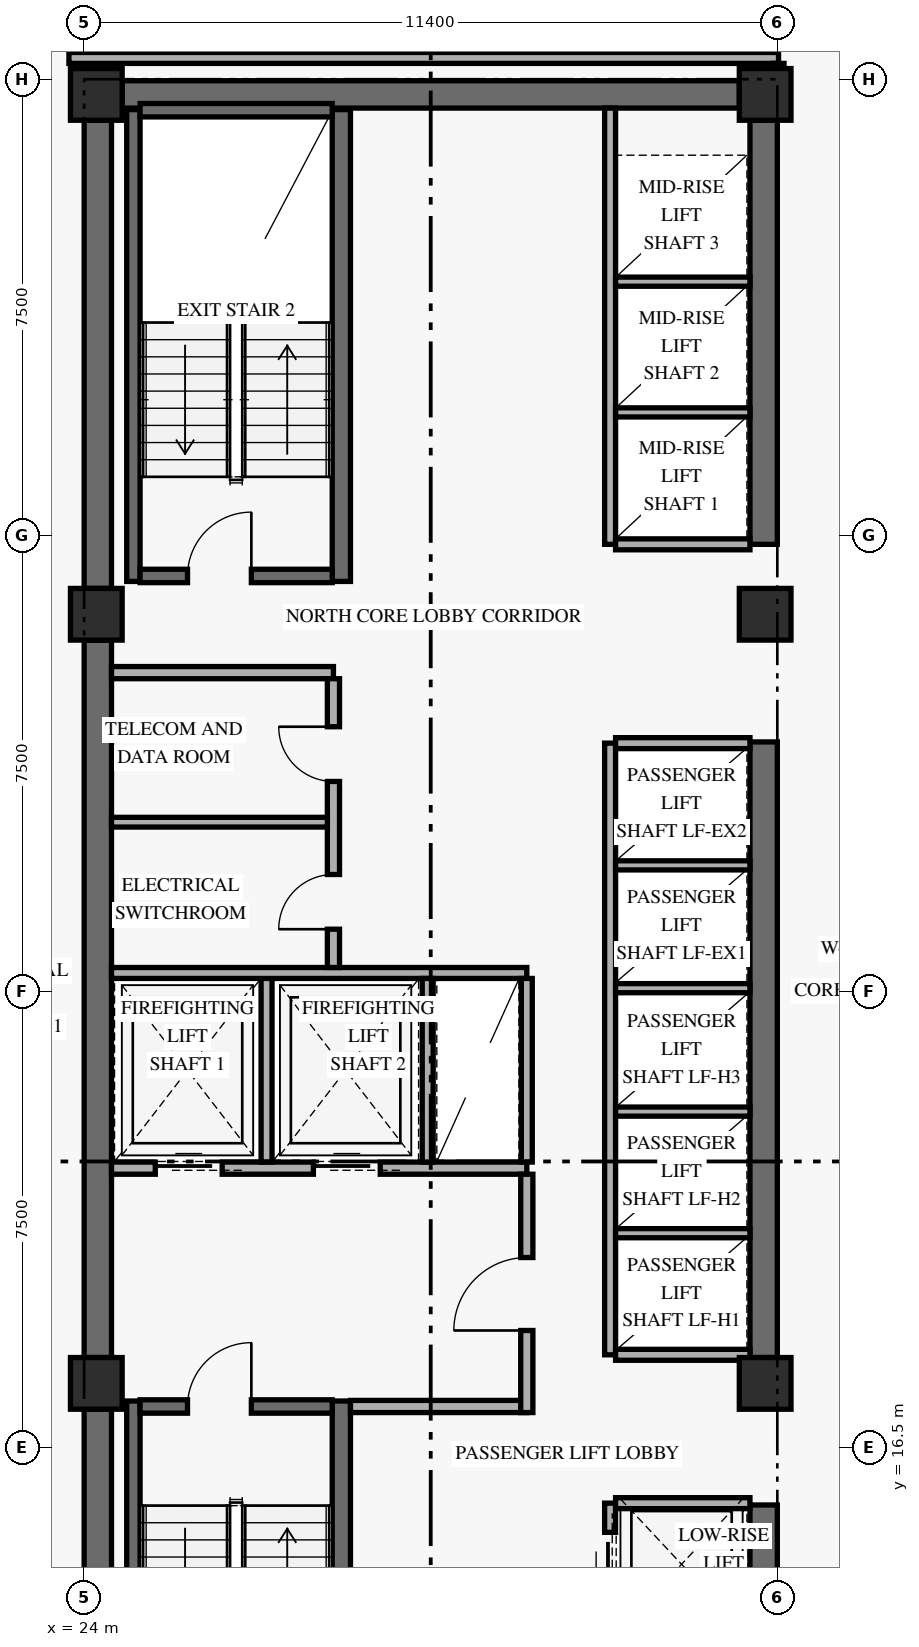
"""IFC4 building model, lengths in metres.
Left out: names, types, materials, properties, quantities, classifications, styles, units other than length and angle.
Written with IfcOpenShell. Run it as: python <this file> out.ifc"""

import sys

from ifc_helpers import new_model, si_unit, direction, frame, frame_2d, origin, origin_2d, place, context, subcontext, project, spatial, rectangle, extrude, element, fill, save


model = new_model("IFC4")
c1 = context("Model", 3, precision=1e-05, world=origin(), true_north=direction((0.0, 1.0)))
c2 = subcontext(c1, "Body", "Model", "MODEL_VIEW")
j1 = project(units=[si_unit("LENGTHUNIT", "METRE"), si_unit("PLANEANGLEUNIT", "RADIAN")], contexts=[c1])
p1 = place(None, origin())
s1 = spatial("IfcSite", under=j1, at=p1, CompositionType="ELEMENT")
p2 = place(p1, origin())
s2 = spatial("IfcBuilding", under=s1, at=p2, CompositionType="ELEMENT")
p3 = place(p2, frame((0.0, 0.0, 27.6)))
s3 = spatial("IfcBuildingStorey", under=s2, at=p3, CompositionType="ELEMENT", Elevation=27.6)
p4 = place(p3, frame((24.225, 9.675, 0.0), z_axis=(0.0, 0.0, 1.0), x_axis=(0.0, 1.0, 0.0)))
e1 = element("IfcWall", 1, at=p4, inside=s3, PredefinedType="SHEAR", context=c2, shape_type="SweptSolid", body=[
    extrude(rectangle(XDim=7.45, YDim=0.45, at=frame_2d((3.725, 0.0))), origin(), (0.0, 0.0, 1.0), 2.667),
])
p5 = place(p3, frame((24.225, 17.975, 0.0), z_axis=(0.0, 0.0, 1.0), x_axis=(0.0, 1.0, 0.0)))
e2 = element("IfcWall", 2, at=p5, inside=s3, PredefinedType="SHEAR", context=c2, shape_type="SweptSolid", body=[
    extrude(rectangle(XDim=11.8, YDim=0.45, at=frame_2d((5.9, 0.0))), origin(), (0.0, 0.0, 1.0), 2.667),
])
p6 = place(p3, frame((24.225, 30.625, 0.0), z_axis=(0.0, 0.0, 1.0), x_axis=(0.0, 1.0, 0.0)))
e3 = element("IfcWall", 3, at=p6, inside=s3, PredefinedType="SHEAR", context=c2, shape_type="SweptSolid", body=[
    extrude(rectangle(XDim=7.7, YDim=0.45, at=frame_2d((3.85, 0.0))), origin(), (0.0, 0.0, 1.0), 2.667),
])
p7 = place(p3, frame((35.175, 9.675, 0.0), z_axis=(0.0, 0.0, 1.0), x_axis=(0.0, 1.0, 0.0)))
e4 = element("IfcWall", 4, at=p7, inside=s3, PredefinedType="SHEAR", context=c2, shape_type="SweptSolid", body=[
    extrude(rectangle(XDim=5.875, YDim=0.45, at=frame_2d((2.938, 0.0))), origin(), (0.0, 0.0, 1.0), 2.667),
])
p8 = place(p3, frame((35.175, 17.975, 0.0), z_axis=(0.0, 0.0, 1.0), x_axis=(0.0, 1.0, 0.0)))
e5 = element("IfcWall", 5, at=p8, inside=s3, PredefinedType="SHEAR", context=c2, shape_type="SweptSolid", body=[
    extrude(rectangle(XDim=10.125, YDim=0.45, at=frame_2d((5.062, 0.0))), origin(), (0.0, 0.0, 1.0), 2.667),
])
p9 = place(p3, frame((35.175, 31.35, 0.0), z_axis=(0.0, 0.0, 1.0), x_axis=(0.0, 1.0, 0.0)))
e6 = element("IfcWall", 6, at=p9, inside=s3, PredefinedType="SHEAR", context=c2, shape_type="SweptSolid", body=[
    extrude(rectangle(XDim=6.975, YDim=0.45, at=frame_2d((3.487, 0.0))), origin(), (0.0, 0.0, 1.0), 2.667),
])
p10 = place(p3, frame((24.625, 38.75, 0.0), z_axis=(0.0, 0.0, 1.0), x_axis=(1.0, 0.0, 0.0)))
e7 = element("IfcWall", 7, at=p10, inside=s3, PredefinedType="SHEAR", context=c2, shape_type="SweptSolid", body=[
    extrude(rectangle(XDim=10.15, YDim=0.45, at=frame_2d((5.075, 0.0))), origin(), (0.0, 0.0, 1.0), 3.36),
])
p11 = place(p3, frame((24.81, 9.5, 0.0), z_axis=(0.0, 0.0, 1.0), x_axis=(0.0, 1.0, 0.0)))
e8 = element("IfcWall", 8, at=p11, inside=s3, PredefinedType="SHEAR", context=c2, shape_type="SweptSolid", body=[
    extrude(rectangle(XDim=7.76, YDim=0.22, at=frame_2d((3.88, 0.0))), origin(), (0.0, 0.0, 1.0), 3.36),
])
p12 = place(p3, frame((28.23, 9.5, 0.0), z_axis=(0.0, 0.0, 1.0), x_axis=(0.0, 1.0, 0.0)))
e9 = element("IfcWall", 9, at=p12, inside=s3, PredefinedType="SHEAR", context=c2, shape_type="SweptSolid", body=[
    extrude(rectangle(XDim=7.76, YDim=0.3, at=frame_2d((3.88, 0.0))), origin(), (0.0, 0.0, 1.0), 3.36),
])
p13 = place(p3, frame((24.92, 17.17, 0.0), z_axis=(0.0, 0.0, 1.0), x_axis=(1.0, 0.0, 0.0)))
e10 = element("IfcWall", 10, at=p13, inside=s3, PredefinedType="SHEAR", context=c2, shape_type="SweptSolid", body=[
    extrude(rectangle(XDim=3.16, YDim=0.22, at=frame_2d((1.58, 0.0))), origin(), (0.0, 0.0, 1.0), 3.36),
])
p14 = place(p13, frame((0.78, 0.0, 0.0)))
e11 = element("IfcOpeningElement", 11, at=p14, cuts=e10, PredefinedType="OPENING", context=c2, shape_type="SweptSolid", body=[
    extrude(rectangle(XDim=1.05, YDim=2.15, at=frame_2d((0.525, 1.075))), frame((0.0, 0.12, 0.0), z_axis=(0.0, -1.0, 0.0), x_axis=(1.0, 0.0, 0.0)), (0.0, 0.0, 1.0), 0.24),
])
p15 = place(p3, frame((24.81, 30.74, 0.0), z_axis=(0.0, 0.0, 1.0), x_axis=(0.0, 1.0, 0.0)))
e12 = element("IfcWall", 12, at=p15, inside=s3, PredefinedType="SHEAR", context=c2, shape_type="SweptSolid", body=[
    extrude(rectangle(XDim=7.76, YDim=0.22, at=frame_2d((3.88, 0.0))), origin(), (0.0, 0.0, 1.0), 3.36),
])
p16 = place(p3, frame((28.23, 30.74, 0.0), z_axis=(0.0, 0.0, 1.0), x_axis=(0.0, 1.0, 0.0)))
e13 = element("IfcWall", 13, at=p16, inside=s3, PredefinedType="SHEAR", context=c2, shape_type="SweptSolid", body=[
    extrude(rectangle(XDim=7.76, YDim=0.3, at=frame_2d((3.88, 0.0))), origin(), (0.0, 0.0, 1.0), 3.36),
])
p17 = place(p3, frame((24.92, 30.83, 0.0), z_axis=(0.0, 0.0, 1.0), x_axis=(1.0, 0.0, 0.0)))
e14 = element("IfcWall", 14, at=p17, inside=s3, PredefinedType="SHEAR", context=c2, shape_type="SweptSolid", body=[
    extrude(rectangle(XDim=3.16, YDim=0.22, at=frame_2d((1.58, 0.0))), origin(), (0.0, 0.0, 1.0), 3.36),
])
p18 = place(p17, frame((0.78, 0.0, 0.0)))
e15 = element("IfcOpeningElement", 15, at=p18, cuts=e14, PredefinedType="OPENING", context=c2, shape_type="SweptSolid", body=[
    extrude(rectangle(XDim=1.05, YDim=2.15, at=frame_2d((0.525, 1.075))), frame((0.0, 0.12, 0.0), z_axis=(0.0, -1.0, 0.0), x_axis=(1.0, 0.0, 0.0)), (0.0, 0.0, 1.0), 0.24),
])
p19 = place(p3, frame((24.92, 38.49, 0.0), z_axis=(0.0, 0.0, 1.0), x_axis=(1.0, 0.0, 0.0)))
e16 = element("IfcWall", 16, at=p19, inside=s3, PredefinedType="SHEAR", context=c2, shape_type="SweptSolid", body=[
    extrude(rectangle(XDim=3.16, YDim=0.22, at=frame_2d((1.58, 0.0))), origin(), (0.0, 0.0, 1.0), 3.36),
])
for number, where, z_axis, x_axis in (
    (17, (24.2, 17.55, 0.0), (0.0, 0.0, 1.0), (1.0, 0.0, 0.0)),
    (18, (24.2, 30.2, 0.0), (0.0, 0.0, 1.0), (1.0, 0.0, 0.0)),
    (19, (24.2, 38.75, 0.0), (0.0, 0.0, 1.0), (1.0, 0.0, 0.0)),
    (20, (35.2, 17.55, 0.0), (0.0, 0.0, 1.0), (1.0, 0.0, 0.0)),
    (21, (35.2, 30.2, 0.0), (0.0, 0.0, 1.0), (1.0, 0.0, 0.0)),
    (22, (35.2, 38.75, 0.0), (0.0, 0.0, 1.0), (1.0, 0.0, 0.0)),
):
    element("IfcColumn", number, at=place(p3, frame(where, z_axis=z_axis, x_axis=x_axis)), inside=s3, PredefinedType="COLUMN", context=c2, shape_type="SweptSolid", body=[
        extrude(rectangle(XDim=0.85, YDim=0.85, at=origin_2d()), origin(), (0.0, 0.0, 1.0), 3.6),
    ])
p20 = place(p3, frame((24.45, 21.09, 0.0), z_axis=(0.0, 0.0, 1.0), x_axis=(1.0, 0.0, 0.0)))
e23 = element("IfcWall", 23, at=p20, inside=s3, PredefinedType="STANDARD", context=c2, shape_type="SweptSolid", body=[
    extrude(rectangle(XDim=6.83, YDim=0.2, at=frame_2d((3.415, 0.0))), origin(), (0.0, 0.0, 1.0), 3.36),
])
p21 = place(p20, frame((0.72, 0.0, 0.0)))
e24 = element("IfcOpeningElement", 24, at=p21, cuts=e23, PredefinedType="OPENING", context=c2, shape_type="SweptSolid", body=[
    extrude(rectangle(XDim=1.1, YDim=2.2, at=frame_2d((0.55, 1.1))), frame((0.0, 0.11, 0.0), z_axis=(0.0, -1.0, 0.0), x_axis=(1.0, 0.0, 0.0)), (0.0, 0.0, 1.0), 0.22),
])
p22 = place(p20, frame((3.32, 0.0, 0.0)))
e25 = element("IfcOpeningElement", 25, at=p22, cuts=e23, PredefinedType="OPENING", context=c2, shape_type="SweptSolid", body=[
    extrude(rectangle(XDim=1.1, YDim=2.2, at=frame_2d((0.55, 1.1))), frame((0.0, 0.11, 0.0), z_axis=(0.0, -1.0, 0.0), x_axis=(1.0, 0.0, 0.0)), (0.0, 0.0, 1.0), 0.22),
])
p23 = place(p3, frame((28.38, 17.17, 0.0), z_axis=(0.0, 0.0, 1.0), x_axis=(1.0, 0.0, 0.0)))
e26 = element("IfcWall", 26, at=p23, inside=s3, PredefinedType="STANDARD", context=c2, shape_type="SweptSolid", body=[
    extrude(rectangle(XDim=2.9, YDim=0.2, at=frame_2d((1.45, 0.0))), origin(), (0.0, 0.0, 1.0), 3.36),
])
p24 = place(p3, frame((31.28, 17.07, 0.0), z_axis=(0.0, 0.0, 1.0), x_axis=(0.0, 1.0, 0.0)))
e27 = element("IfcWall", 27, at=p24, inside=s3, PredefinedType="STANDARD", context=c2, shape_type="SweptSolid", body=[
    extrude(rectangle(XDim=3.92, YDim=0.2, at=frame_2d((1.96, 0.0))), origin(), (0.0, 0.0, 1.0), 2.649),
])
p25 = place(p24, frame((1.35, 0.0, 0.0)))
e28 = element("IfcOpeningElement", 28, at=p25, cuts=e27, PredefinedType="OPENING", context=c2, shape_type="SweptSolid", body=[
    extrude(rectangle(XDim=1.2, YDim=2.15, at=frame_2d((0.6, 1.075))), frame((0.0, 0.11, 0.0), z_axis=(0.0, -1.0, 0.0), x_axis=(1.0, 0.0, 0.0)), (0.0, 0.0, 1.0), 0.22),
])
p26 = place(p3, frame((27.0, 21.19, 0.0), z_axis=(0.0, 0.0, 1.0), x_axis=(0.0, 1.0, 0.0)))
e29 = element("IfcWall", 29, at=p26, inside=s3, PredefinedType="STANDARD", context=c2, shape_type="SweptSolid", body=[
    extrude(rectangle(XDim=3.11, YDim=0.18, at=frame_2d((1.555, 0.0))), origin(), (0.0, 0.0, 1.0), 3.36),
])
p27 = place(p3, frame((24.45, 24.3, 0.0), z_axis=(0.0, 0.0, 1.0), x_axis=(1.0, 0.0, 0.0)))
e30 = element("IfcWall", 30, at=p27, inside=s3, PredefinedType="STANDARD", context=c2, shape_type="SweptSolid", body=[
    extrude(rectangle(XDim=6.83, YDim=0.18, at=frame_2d((3.415, 0.0))), origin(), (0.0, 0.0, 1.0), 3.36),
])
for number, where, z_axis, x_axis in (
    (31, (29.65, 21.19, 0.0), (0.0, 0.0, 1.0), (0.0, 1.0, 0.0)),
    (32, (31.28, 21.19, 0.0), (0.0, 0.0, 1.0), (0.0, 1.0, 0.0)),
):
    element("IfcWall", number, at=place(p3, frame(where, z_axis=z_axis, x_axis=x_axis)), inside=s3, PredefinedType="STANDARD", context=c2, shape_type="SweptSolid", body=[
        extrude(rectangle(XDim=3.02, YDim=0.18, at=frame_2d((1.51, 0.0))), origin(), (0.0, 0.0, 1.0), 3.36),
    ])
p28 = place(p3, frame((24.45, 29.24, 0.0), z_axis=(0.0, 0.0, 1.0), x_axis=(1.0, 0.0, 0.0)))
e33 = element("IfcWall", 33, at=p28, inside=s3, PredefinedType="STANDARD", context=c2, shape_type="SweptSolid", body=[
    extrude(rectangle(XDim=3.65, YDim=0.2, at=frame_2d((1.825, 0.0))), origin(), (0.0, 0.0, 1.0), 3.36),
])
p29 = place(p3, frame((28.1, 24.39, 0.0), z_axis=(0.0, 0.0, 1.0), x_axis=(0.0, 1.0, 0.0)))
e34 = element("IfcWall", 34, at=p29, inside=s3, PredefinedType="STANDARD", context=c2, shape_type="SweptSolid", body=[
    extrude(rectangle(XDim=4.75, YDim=0.2, at=frame_2d((2.375, 0.0))), origin(), (0.0, 0.0, 1.0), 3.36),
])
p30 = place(p29, frame((0.63, 0.0, 0.0)))
e35 = element("IfcOpeningElement", 35, at=p30, cuts=e34, PredefinedType="OPENING", context=c2, shape_type="SweptSolid", body=[
    extrude(rectangle(XDim=0.9, YDim=2.1, at=frame_2d((0.45, 1.05))), frame((0.0, 0.11, 0.0), z_axis=(0.0, -1.0, 0.0), x_axis=(1.0, 0.0, 0.0)), (0.0, 0.0, 1.0), 0.22),
])
p31 = place(p29, frame((3.06, 0.0, 0.0)))
e36 = element("IfcOpeningElement", 36, at=p31, cuts=e34, PredefinedType="OPENING", context=c2, shape_type="SweptSolid", body=[
    extrude(rectangle(XDim=0.9, YDim=2.1, at=frame_2d((0.45, 1.05))), frame((0.0, 0.11, 0.0), z_axis=(0.0, -1.0, 0.0), x_axis=(1.0, 0.0, 0.0)), (0.0, 0.0, 1.0), 0.22),
])
p32 = place(p3, frame((24.45, 26.78, 0.0), z_axis=(0.0, 0.0, 1.0), x_axis=(1.0, 0.0, 0.0)))
e37 = element("IfcWall", 37, at=p32, inside=s3, PredefinedType="PARTITIONING", context=c2, shape_type="SweptSolid", body=[
    extrude(rectangle(XDim=3.55, YDim=0.16, at=frame_2d((1.775, 0.0))), origin(), (0.0, 0.0, 1.0), 3.36),
])
p33 = place(p3, frame((32.65, 9.5, 0.0), z_axis=(0.0, 0.0, 1.0), x_axis=(0.0, 1.0, 0.0)))
e38 = element("IfcWall", 38, at=p33, inside=s3, PredefinedType="STANDARD", context=c2, shape_type="SweptSolid", body=[
    extrude(rectangle(XDim=6.08, YDim=0.18, at=frame_2d((3.04, 0.0))), origin(), (0.0, 0.0, 1.0), 3.36),
])
p34 = place(p33, frame((0.55, 0.0, 0.0)))
e39 = element("IfcOpeningElement", 39, at=p34, cuts=e38, PredefinedType="OPENING", context=c2, shape_type="SweptSolid", body=[
    extrude(rectangle(XDim=1.05, YDim=2.2, at=frame_2d((0.525, 1.1))), frame((0.0, 0.1, 0.0), z_axis=(0.0, -1.0, 0.0), x_axis=(1.0, 0.0, 0.0)), (0.0, 0.0, 1.0), 0.2),
])
p35 = place(p33, frame((2.55, 0.0, 0.0)))
e40 = element("IfcOpeningElement", 40, at=p35, cuts=e38, PredefinedType="OPENING", context=c2, shape_type="SweptSolid", body=[
    extrude(rectangle(XDim=1.05, YDim=2.2, at=frame_2d((0.525, 1.1))), frame((0.0, 0.1, 0.0), z_axis=(0.0, -1.0, 0.0), x_axis=(1.0, 0.0, 0.0)), (0.0, 0.0, 1.0), 0.2),
])
p36 = place(p33, frame((4.55, 0.0, 0.0)))
e41 = element("IfcOpeningElement", 41, at=p36, cuts=e38, PredefinedType="OPENING", context=c2, shape_type="SweptSolid", body=[
    extrude(rectangle(XDim=1.05, YDim=2.2, at=frame_2d((0.525, 1.1))), frame((0.0, 0.1, 0.0), z_axis=(0.0, -1.0, 0.0), x_axis=(1.0, 0.0, 0.0)), (0.0, 0.0, 1.0), 0.2),
])
p37 = place(p3, frame((32.74, 15.58, 0.0), z_axis=(0.0, 0.0, 1.0), x_axis=(1.0, 0.0, 0.0)))
e42 = element("IfcWall", 42, at=p37, inside=s3, PredefinedType="STANDARD", context=c2, shape_type="SweptSolid", body=[
    extrude(rectangle(XDim=2.21, YDim=0.18, at=frame_2d((1.105, 0.0))), origin(), (0.0, 0.0, 1.0), 3.36),
])
p38 = place(p3, frame((32.65, 18.02, 0.0), z_axis=(0.0, 0.0, 1.0), x_axis=(0.0, 1.0, 0.0)))
e43 = element("IfcWall", 43, at=p38, inside=s3, PredefinedType="STANDARD", context=c2, shape_type="SweptSolid", body=[
    extrude(rectangle(XDim=10.06, YDim=0.18, at=frame_2d((5.03, 0.0))), origin(), (0.0, 0.0, 1.0), 3.36),
])
for number, where, z_axis, x_axis in (
    (44, (32.74, 18.02, 0.0), (0.0, 0.0, 1.0), (1.0, 0.0, 0.0)),
    (45, (32.74, 28.08, 0.0), (0.0, 0.0, 1.0), (1.0, 0.0, 0.0)),
):
    element("IfcWall", number, at=place(p3, frame(where, z_axis=z_axis, x_axis=x_axis)), inside=s3, PredefinedType="STANDARD", context=c2, shape_type="SweptSolid", body=[
        extrude(rectangle(XDim=2.21, YDim=0.18, at=frame_2d((1.105, 0.0))), origin(), (0.0, 0.0, 1.0), 3.36),
    ])
for number, where, z_axis, x_axis in (
    (46, (32.74, 20.02, 0.0), (0.0, 0.0, 1.0), (1.0, 0.0, 0.0)),
    (47, (32.74, 22.02, 0.0), (0.0, 0.0, 1.0), (1.0, 0.0, 0.0)),
    (48, (32.74, 24.05, 0.0), (0.0, 0.0, 1.0), (1.0, 0.0, 0.0)),
    (49, (32.74, 26.07, 0.0), (0.0, 0.0, 1.0), (1.0, 0.0, 0.0)),
):
    element("IfcWall", number, at=place(p3, frame(where, z_axis=z_axis, x_axis=x_axis)), inside=s3, PredefinedType="STANDARD", context=c2, shape_type="SweptSolid", body=[
        extrude(rectangle(XDim=2.21, YDim=0.15, at=frame_2d((1.105, 0.0))), origin(), (0.0, 0.0, 1.0), 3.36),
    ])
p39 = place(p3, frame((32.65, 31.35, 0.0), z_axis=(0.0, 0.0, 1.0), x_axis=(0.0, 1.0, 0.0)))
e50 = element("IfcWall", 50, at=p39, inside=s3, PredefinedType="STANDARD", context=c2, shape_type="SweptSolid", body=[
    extrude(rectangle(XDim=7.175, YDim=0.18, at=frame_2d((3.587, 0.0))), origin(), (0.0, 0.0, 1.0), 3.36),
])
p40 = place(p3, frame((32.74, 31.35, 0.0), z_axis=(0.0, 0.0, 1.0), x_axis=(1.0, 0.0, 0.0)))
e51 = element("IfcWall", 51, at=p40, inside=s3, PredefinedType="STANDARD", context=c2, shape_type="SweptSolid", body=[
    extrude(rectangle(XDim=2.21, YDim=0.18, at=frame_2d((1.105, 0.0))), origin(), (0.0, 0.0, 1.0), 3.36),
])
for number, where, z_axis, x_axis in (
    (52, (32.74, 33.52, 0.0), (0.0, 0.0, 1.0), (1.0, 0.0, 0.0)),
    (53, (32.74, 35.67, 0.0), (0.0, 0.0, 1.0), (1.0, 0.0, 0.0)),
):
    element("IfcWall", number, at=place(p3, frame(where, z_axis=z_axis, x_axis=x_axis)), inside=s3, PredefinedType="STANDARD", context=c2, shape_type="SweptSolid", body=[
        extrude(rectangle(XDim=2.21, YDim=0.15, at=frame_2d((1.105, 0.0))), origin(), (0.0, 0.0, 1.0), 3.36),
    ])
p41 = place(p3, frame((23.75, 39.35, 0.0), z_axis=(0.0, 0.0, 1.0), x_axis=(1.0, 0.0, 0.0)))
e54 = element("IfcWall", 54, at=p41, inside=s3, PredefinedType="STANDARD", context=c2, shape_type="SweptSolid", body=[
    extrude(rectangle(XDim=11.67, YDim=0.18, at=frame_2d((5.835, 0.0))), origin(), (0.0, 0.0, 1.0), 2.649),
])
p42 = place(p3, frame((35.42, 38.75, 0.0), z_axis=(0.0, 0.0, 1.0), x_axis=(0.0, 1.0, 0.0)))
e55 = element("IfcWall", 55, at=p42, inside=s3, PredefinedType="STANDARD", context=c2, shape_type="SweptSolid", body=[
    extrude(rectangle(XDim=0.51, YDim=0.18, at=frame_2d((0.255, 0.0))), origin(), (0.0, 0.0, 1.0), 3.36),
])
p43 = place(p14, frame((1.05, 0.0, 0.0), z_axis=(0.0, 0.0, 1.0), x_axis=(-1.0, 0.0, 0.0)))
e56 = element("IfcDoor", 56, at=p43, inside=s3, OperationType="SINGLE_SWING_LEFT", PredefinedType="DOOR", context=c2, shape_type="SweptSolid", body=[
    extrude(rectangle(XDim=1.05, YDim=2.15, at=frame_2d((0.525, 1.075))), frame((0.0, 0.025, 0.0), z_axis=(0.0, -1.0, 0.0), x_axis=(1.0, 0.0, 0.0)), (0.0, 0.0, 1.0), 0.05),
])
fill(e11, e56)
p44 = place(p18, origin())
e57 = element("IfcDoor", 57, at=p44, inside=s3, OperationType="SINGLE_SWING_RIGHT", PredefinedType="DOOR", context=c2, shape_type="SweptSolid", body=[
    extrude(rectangle(XDim=1.05, YDim=2.15, at=frame_2d((0.525, 1.075))), frame((0.0, 0.025, 0.0), z_axis=(0.0, -1.0, 0.0), x_axis=(1.0, 0.0, 0.0)), (0.0, 0.0, 1.0), 0.05),
])
fill(e15, e57)
p45 = place(p21, origin())
e58 = element("IfcDoor", 58, at=p45, inside=s3, OperationType="SLIDING_TO_LEFT", PredefinedType="DOOR", context=c2, shape_type="SweptSolid", body=[
    extrude(rectangle(XDim=1.1, YDim=2.2, at=frame_2d((0.55, 1.1))), frame((0.0, 0.025, 0.0), z_axis=(0.0, -1.0, 0.0), x_axis=(1.0, 0.0, 0.0)), (0.0, 0.0, 1.0), 0.05),
])
fill(e24, e58)
p46 = place(p22, origin())
e59 = element("IfcDoor", 59, at=p46, inside=s3, OperationType="SLIDING_TO_LEFT", PredefinedType="DOOR", context=c2, shape_type="SweptSolid", body=[
    extrude(rectangle(XDim=1.1, YDim=2.2, at=frame_2d((0.55, 1.1))), frame((0.0, 0.025, 0.0), z_axis=(0.0, -1.0, 0.0), x_axis=(1.0, 0.0, 0.0)), (0.0, 0.0, 1.0), 0.05),
])
fill(e25, e59)
p47 = place(p25, origin())
e60 = element("IfcDoor", 60, at=p47, inside=s3, OperationType="SINGLE_SWING_LEFT", PredefinedType="DOOR", context=c2, shape_type="SweptSolid", body=[
    extrude(rectangle(XDim=1.2, YDim=2.15, at=frame_2d((0.6, 1.075))), frame((0.0, 0.025, 0.0), z_axis=(0.0, -1.0, 0.0), x_axis=(1.0, 0.0, 0.0)), (0.0, 0.0, 1.0), 0.05),
])
fill(e28, e60)
p48 = place(p30, origin())
e61 = element("IfcDoor", 61, at=p48, inside=s3, OperationType="SINGLE_SWING_LEFT", PredefinedType="DOOR", context=c2, shape_type="SweptSolid", body=[
    extrude(rectangle(XDim=0.9, YDim=2.1, at=frame_2d((0.45, 1.05))), frame((0.0, 0.025, 0.0), z_axis=(0.0, -1.0, 0.0), x_axis=(1.0, 0.0, 0.0)), (0.0, 0.0, 1.0), 0.05),
])
fill(e35, e61)
p49 = place(p31, origin())
e62 = element("IfcDoor", 62, at=p49, inside=s3, OperationType="SINGLE_SWING_RIGHT", PredefinedType="DOOR", context=c2, shape_type="SweptSolid", body=[
    extrude(rectangle(XDim=0.9, YDim=2.1, at=frame_2d((0.45, 1.05))), frame((0.0, 0.025, 0.0), z_axis=(0.0, -1.0, 0.0), x_axis=(1.0, 0.0, 0.0)), (0.0, 0.0, 1.0), 0.05),
])
fill(e36, e62)
p50 = place(p36, origin())
e63 = element("IfcDoor", 63, at=p50, inside=s3, OperationType="SLIDING_TO_LEFT", PredefinedType="DOOR", context=c2, shape_type="SweptSolid", body=[
    extrude(rectangle(XDim=1.05, YDim=2.2, at=frame_2d((0.525, 1.1))), frame((0.0, 0.025, 0.0), z_axis=(0.0, -1.0, 0.0), x_axis=(1.0, 0.0, 0.0)), (0.0, 0.0, 1.0), 0.05),
])
fill(e41, e63)
save(model, sys.argv[1])
